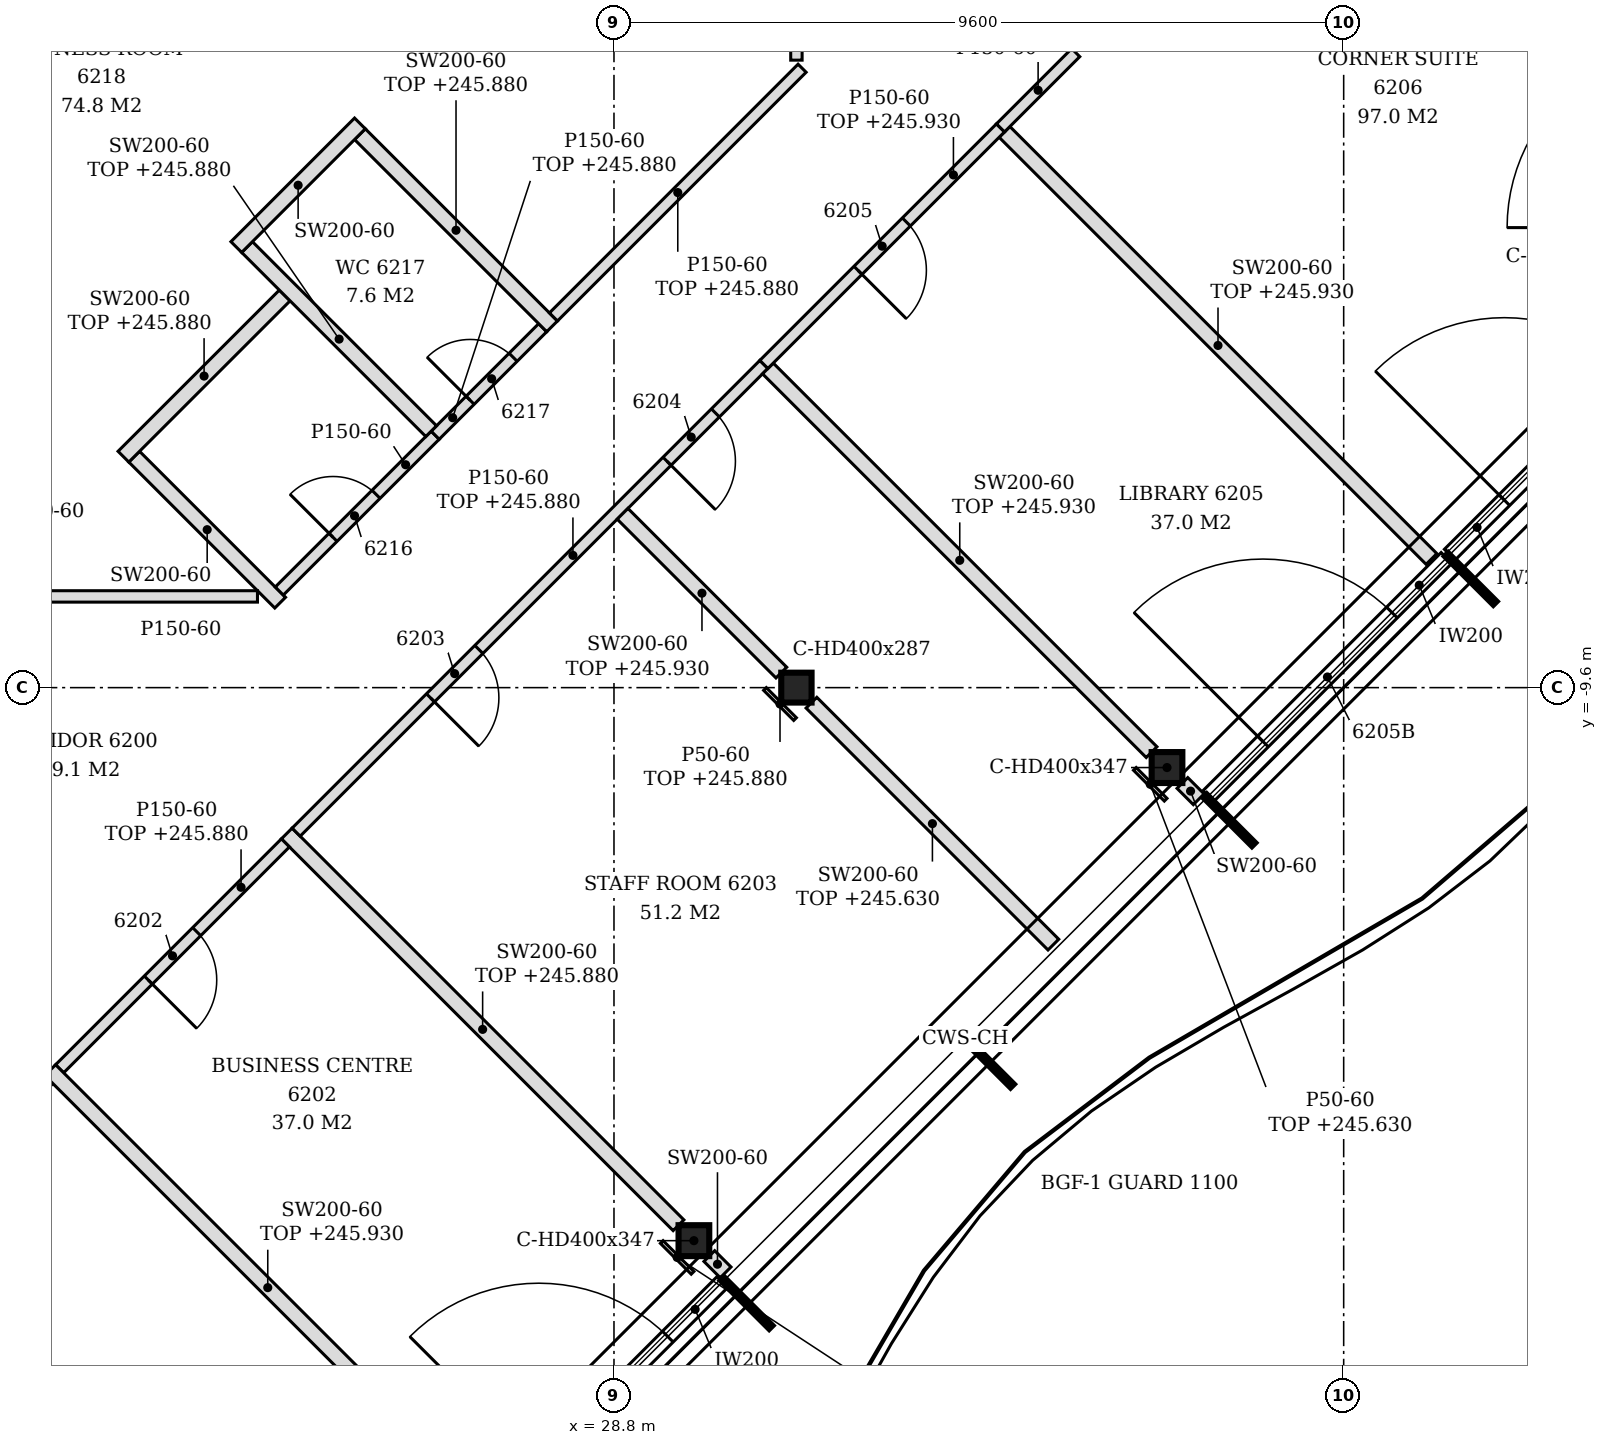
"""IFC4 building model, lengths in metres.
Left out: names, types, materials, properties, quantities, classifications, styles, units other than length and angle.
Written with IfcOpenShell. Run it as: python <this file> out.ifc"""

import sys

from ifc_helpers import new_model, si_unit, direction, frame, frame_2d, origin, origin_2d, place, context, subcontext, project, spatial, rectangle, i_section, extrude, element, fill, save


model = new_model("IFC4")
c1 = context("Model", 3, precision=1e-05, world=origin(), true_north=direction((0.0, 1.0)))
c2 = subcontext(c1, "Body", "Model", "MODEL_VIEW")
j1 = project(units=[si_unit("LENGTHUNIT", "METRE"), si_unit("PLANEANGLEUNIT", "RADIAN")], contexts=[c1])
p1 = place(None, origin())
s1 = spatial("IfcSite", under=j1, at=p1, CompositionType="ELEMENT")
p2 = place(p1, origin())
s2 = spatial("IfcBuilding", under=s1, at=p2, CompositionType="ELEMENT")
p3 = place(p2, frame((0.0, 0.0, 243.0)))
s3 = spatial("IfcBuildingStorey", under=s2, at=p3, CompositionType="ELEMENT", Elevation=243.0)
for number, where, z_axis, x_axis in (
    (1, (29.852, -16.876, -0.15), (0.0, 0.0, 1.0), (1.0, 0.0, 0.0)),
    (2, (36.076, -10.652, -0.15), (0.0, 0.0, 1.0), (1.0, 0.0, 0.0)),
):
    element("IfcColumn", number, at=place(p3, frame(where, z_axis=z_axis, x_axis=x_axis)), inside=s3, PredefinedType="COLUMN", context=c2, shape_type="SweptSolid", body=[
        extrude(i_section(OverallWidth=0.404, OverallDepth=0.407, WebThickness=0.027, FlangeThickness=0.044, FilletRadius=0.015, at=origin_2d()), origin(), (0.0, 0.0, 1.0), 3.6),
    ])
p4 = place(p3, frame((31.2, -9.6, -0.15), z_axis=(0.0, 0.0, 1.0), x_axis=(1.0, 0.0, 0.0)))
e3 = element("IfcColumn", 3, at=p4, inside=s3, PredefinedType="COLUMN", context=c2, shape_type="SweptSolid", body=[
    extrude(i_section(OverallWidth=0.399, OverallDepth=0.393, WebThickness=0.023, FlangeThickness=0.037, FilletRadius=0.015, at=origin_2d()), origin(), (0.0, 0.0, 1.0), 3.6),
])
p5 = place(p3, frame((27.093, -20.553, 0.0), z_axis=(0.0, 0.0, 1.0), x_axis=(0.707079231393, 0.707134329907, 0.0)))
e4 = element("IfcWall", 4, at=p5, inside=s3, PredefinedType="NOTDEFINED", context=c2, shape_type="SweptSolid", body=[
    extrude(rectangle(XDim=4.431, YDim=0.2, at=frame_2d((2.215, 0.0))), origin(), (0.0, 0.0, 1.0), 3.45),
])
p6 = place(p5, frame((1.015, 0.0, 0.0)))
e5 = element("IfcOpeningElement", 5, at=p6, cuts=e4, PredefinedType="OPENING", context=c2, shape_type="SweptSolid", body=[
    extrude(rectangle(XDim=2.4, YDim=2.4, at=frame_2d((1.2, 1.2))), frame((0.0, 0.11, 0.0), z_axis=(0.0, -1.0, 0.0), x_axis=(1.0, 0.0, 0.0)), (0.0, 0.0, 1.0), 0.22),
])
p7 = place(p3, frame((36.62, -11.026, 0.0), z_axis=(0.0, 0.0, 1.0), x_axis=(0.707106781187, 0.707106781187, 0.0)))
e6 = element("IfcWall", 6, at=p7, inside=s3, PredefinedType="NOTDEFINED", context=c2, shape_type="SweptSolid", body=[
    extrude(rectangle(XDim=4.431, YDim=0.2, at=frame_2d((2.215, 0.0))), origin(), (0.0, 0.0, 1.0), 3.45),
])
p8 = place(p7, frame((1.015, 0.0, 0.0)))
e7 = element("IfcOpeningElement", 7, at=p8, cuts=e6, PredefinedType="OPENING", context=c2, shape_type="SweptSolid", body=[
    extrude(rectangle(XDim=2.4, YDim=2.4, at=frame_2d((1.2, 1.2))), frame((0.0, 0.11, 0.0), z_axis=(0.0, -1.0, 0.0), x_axis=(1.0, 0.0, 0.0)), (0.0, 0.0, 1.0), 0.22),
])
p9 = place(p3, frame((39.796, -7.851, 0.0), z_axis=(0.0, 0.0, 1.0), x_axis=(0.707079168996, 0.707134392299, 0.0)))
e8 = element("IfcWall", 8, at=p9, inside=s3, PredefinedType="NOTDEFINED", context=c2, shape_type="SweptSolid", body=[
    extrude(rectangle(XDim=4.421, YDim=0.2, at=frame_2d((2.21, 0.0))), origin(), (0.0, 0.0, 1.0), 3.45),
])
p10 = place(p9, frame((1.016, 0.0, 0.0)))
e9 = element("IfcOpeningElement", 9, at=p10, cuts=e8, PredefinedType="OPENING", context=c2, shape_type="SweptSolid", body=[
    extrude(rectangle(XDim=2.4, YDim=2.4, at=frame_2d((1.2, 1.2))), frame((0.0, 0.11, 0.0), z_axis=(0.0, -1.0, 0.0), x_axis=(1.0, 0.0, 0.0)), (0.0, 0.0, 1.0), 0.22),
])
p11 = place(p3, frame((27.107, -20.355, 0.0), z_axis=(0.0, 0.0, 1.0), x_axis=(-0.707182179369, 0.707031374964, 0.0)))
e10 = element("IfcWall", 10, at=p11, inside=s3, PredefinedType="PARTITIONING", context=c2, shape_type="SweptSolid", body=[
    extrude(rectangle(XDim=8.095, YDim=0.2, at=frame_2d((4.047, 0.0))), origin(), (0.0, 0.0, 1.0), 2.93),
])
p12 = place(p3, frame((30.269, -17.293, 0.0), z_axis=(0.0, 0.0, 1.0), x_axis=(-0.707509117806, 0.706704215511, 0.0)))
e11 = element("IfcWall", 11, at=p12, inside=s3, PredefinedType="PARTITIONING", context=c2, shape_type="SweptSolid", body=[
    extrude(rectangle(XDim=0.303, YDim=0.2, at=frame_2d((0.152, 0.0))), origin(), (0.0, 0.0, 1.0), 3.45),
])
p13 = place(p3, frame((29.649, -16.673, 0.0), z_axis=(0.0, 0.0, 1.0), x_axis=(-0.707106781187, 0.707106781187, 0.0)))
e12 = element("IfcWall", 12, at=p13, inside=s3, PredefinedType="PARTITIONING", context=c2, shape_type="SweptSolid", body=[
    extrude(rectangle(XDim=7.289, YDim=0.2, at=frame_2d((3.644, 0.0))), origin(), (0.0, 0.0, 1.0), 2.88),
])
p14 = place(p3, frame((20.649, -15.472, 0.0), z_axis=(0.0, 0.0, 1.0), x_axis=(0.707106781187, 0.707106781187, 0.0)))
e13 = element("IfcWall", 13, at=p14, inside=s3, PredefinedType="PARTITIONING", context=c2, shape_type="SweptSolid", body=[
    extrude(rectangle(XDim=1.013, YDim=0.15, at=frame_2d((0.506, 0.0))), origin(), (0.0, 0.0, 1.0), 3.45),
])
p15 = place(p3, frame((21.507, -14.614, 0.0), z_axis=(0.0, 0.0, 1.0), x_axis=(0.706990566745, 0.707222976531, 0.0)))
e14 = element("IfcWall", 14, at=p15, inside=s3, PredefinedType="PARTITIONING", context=c2, shape_type="SweptSolid", body=[
    extrude(rectangle(XDim=4.202, YDim=0.15, at=frame_2d((2.101, 0.0))), origin(), (0.0, 0.0, 1.0), 2.88),
])
p16 = place(p15, frame((1.651, 0.0, 0.0)))
e15 = element("IfcOpeningElement", 15, at=p16, cuts=e14, PredefinedType="OPENING", context=c2, shape_type="SweptSolid", body=[
    extrude(rectangle(XDim=0.9, YDim=2.1, at=frame_2d((0.45, 1.05))), frame((0.0, 0.085, 0.0), z_axis=(0.0, -1.0, 0.0), x_axis=(1.0, 0.0, 0.0)), (0.0, 0.0, 1.0), 0.17),
])
p17 = place(p3, frame((34.581, -12.981, 0.0), z_axis=(0.0, 0.0, 1.0), x_axis=(-0.707133900936, 0.707079660397, 0.0)))
e16 = element("IfcWall", 16, at=p17, inside=s3, PredefinedType="PARTITIONING", context=c2, shape_type="SweptSolid", body=[
    extrude(rectangle(XDim=4.501, YDim=0.2, at=frame_2d((2.25, 0.0))), origin(), (0.0, 0.0, 1.0), 2.63),
])
p18 = place(p3, frame((24.619, -11.501, 0.0), z_axis=(0.0, 0.0, 1.0), x_axis=(0.707106781187, 0.707106781187, 0.0)))
e17 = element("IfcWall", 17, at=p18, inside=s3, PredefinedType="PARTITIONING", context=c2, shape_type="SweptSolid", body=[
    extrude(rectangle(XDim=8.702, YDim=0.15, at=frame_2d((4.351, 0.0))), origin(), (0.0, 0.0, 1.0), 2.88),
])
p19 = place(p18, frame((2.499, 0.0, 0.0)))
e18 = element("IfcOpeningElement", 18, at=p19, cuts=e17, PredefinedType="OPENING", context=c2, shape_type="SweptSolid", body=[
    extrude(rectangle(XDim=0.9, YDim=2.1, at=frame_2d((0.45, 1.05))), frame((0.0, 0.085, 0.0), z_axis=(0.0, -1.0, 0.0), x_axis=(1.0, 0.0, 0.0)), (0.0, 0.0, 1.0), 0.17),
])
p20 = place(p18, frame((6.9, 0.0, 0.0)))
e19 = element("IfcOpeningElement", 19, at=p20, cuts=e17, PredefinedType="OPENING", context=c2, shape_type="SweptSolid", body=[
    extrude(rectangle(XDim=0.9, YDim=2.1, at=frame_2d((0.45, 1.05))), frame((0.0, 0.085, 0.0), z_axis=(0.0, -1.0, 0.0), x_axis=(1.0, 0.0, 0.0)), (0.0, 0.0, 1.0), 0.17),
])
p21 = place(p3, frame((36.493, -11.069, 0.0), z_axis=(0.0, 0.0, 1.0), x_axis=(-0.707106781187, 0.707106781187, 0.0)))
e20 = element("IfcWall", 20, at=p21, inside=s3, PredefinedType="PARTITIONING", context=c2, shape_type="SweptSolid", body=[
    extrude(rectangle(XDim=0.303, YDim=0.2, at=frame_2d((0.152, 0.0))), origin(), (0.0, 0.0, 1.0), 3.45),
])
p22 = place(p3, frame((35.873, -10.449, 0.0), z_axis=(0.0, 0.0, 1.0), x_axis=(-0.707089680867, 0.707123881093, 0.0)))
e21 = element("IfcWall", 21, at=p22, inside=s3, PredefinedType="PARTITIONING", context=c2, shape_type="SweptSolid", body=[
    extrude(rectangle(XDim=7.139, YDim=0.2, at=frame_2d((3.569, 0.0))), origin(), (0.0, 0.0, 1.0), 2.93),
])
p23 = place(p3, frame((31.002, -9.402, 0.0), z_axis=(0.0, 0.0, 1.0), x_axis=(-0.707065460118, 0.70714809984, 0.0)))
e22 = element("IfcWall", 22, at=p23, inside=s3, PredefinedType="PARTITIONING", context=c2, shape_type="SweptSolid", body=[
    extrude(rectangle(XDim=2.954, YDim=0.2, at=frame_2d((1.477, 0.0))), origin(), (0.0, 0.0, 1.0), 2.93),
])
p24 = place(p3, frame((24.408, -8.482, 0.0), z_axis=(0.0, 0.0, 1.0), x_axis=(-0.707061835578, 0.707151723938, 0.0)))
e23 = element("IfcWall", 23, at=p24, inside=s3, PredefinedType="PARTITIONING", context=c2, shape_type="SweptSolid", body=[
    extrude(rectangle(XDim=2.716, YDim=0.2, at=frame_2d((1.358, 0.0))), origin(), (0.0, 0.0, 1.0), 3.45),
])
p25 = place(p3, frame((21.215, -8.4, 0.0), z_axis=(0.0, 0.0, 1.0), x_axis=(1.0, 0.0, 0.0)))
e24 = element("IfcWall", 24, at=p25, inside=s3, PredefinedType="PARTITIONING", context=c2, shape_type="SweptSolid", body=[
    extrude(rectangle(XDim=2.895, YDim=0.15, at=frame_2d((1.447, 0.0))), origin(), (0.0, 0.0, 1.0), 3.45),
])
p26 = place(p3, frame((24.397, -8.329, 0.0), z_axis=(0.0, 0.0, 1.0), x_axis=(0.707275119896, 0.706938402391, 0.0)))
e25 = element("IfcWall", 25, at=p26, inside=s3, PredefinedType="PARTITIONING", context=c2, shape_type="SweptSolid", body=[
    extrude(rectangle(XDim=2.9, YDim=0.15, at=frame_2d((1.45, 0.0))), origin(), (0.0, 0.0, 1.0), 3.45),
])
p27 = place(p26, frame((1.0, 0.0, 0.0)))
e26 = element("IfcOpeningElement", 26, at=p27, cuts=e25, PredefinedType="OPENING", context=c2, shape_type="SweptSolid", body=[
    extrude(rectangle(XDim=0.8, YDim=2.1, at=frame_2d((0.4, 1.05))), frame((0.0, 0.085, 0.0), z_axis=(0.0, -1.0, 0.0), x_axis=(1.0, 0.0, 0.0)), (0.0, 0.0, 1.0), 0.17),
])
p28 = place(p3, frame((39.555, -7.907, 0.0), z_axis=(0.0, 0.0, 1.0), x_axis=(-0.707060685068, 0.7071528743, 0.0)))
e27 = element("IfcWall", 27, at=p28, inside=s3, PredefinedType="PARTITIONING", context=c2, shape_type="SweptSolid", body=[
    extrude(rectangle(XDim=7.945, YDim=0.2, at=frame_2d((3.972, 0.0))), origin(), (0.0, 0.0, 1.0), 2.93),
])
p29 = place(p3, frame((22.346, -6.562, 0.0), z_axis=(0.0, 0.0, 1.0), x_axis=(0.707269502796, 0.706944022123, 0.0)))
e28 = element("IfcWall", 28, at=p29, inside=s3, PredefinedType="PARTITIONING", context=c2, shape_type="SweptSolid", body=[
    extrude(rectangle(XDim=3.0, YDim=0.2, at=frame_2d((1.5, 0.0))), origin(), (0.0, 0.0, 1.0), 2.88),
])
p30 = place(p3, frame((26.448, -6.279, 0.0), z_axis=(0.0, 0.0, 1.0), x_axis=(0.707106781187, 0.707106781187, 0.0)))
e29 = element("IfcWall", 29, at=p30, inside=s3, PredefinedType="PARTITIONING", context=c2, shape_type="SweptSolid", body=[
    extrude(rectangle(XDim=2.0, YDim=0.15, at=frame_2d((1.0, 0.0))), origin(), (0.0, 0.0, 1.0), 2.88),
])
p31 = place(p30, frame((0.65, 0.0, 0.0)))
e30 = element("IfcOpeningElement", 30, at=p31, cuts=e29, PredefinedType="OPENING", context=c2, shape_type="SweptSolid", body=[
    extrude(rectangle(XDim=0.8, YDim=2.1, at=frame_2d((0.4, 1.05))), frame((0.0, 0.085, 0.0), z_axis=(0.0, -1.0, 0.0), x_axis=(1.0, 0.0, 0.0)), (0.0, 0.0, 1.0), 0.17),
])
p32 = place(p3, frame((26.395, -6.226, 0.0), z_axis=(0.0, 0.0, 1.0), x_axis=(-0.707106781187, 0.707106781187, 0.0)))
e31 = element("IfcWall", 31, at=p32, inside=s3, PredefinedType="PARTITIONING", context=c2, shape_type="SweptSolid", body=[
    extrude(rectangle(XDim=3.426, YDim=0.2, at=frame_2d((1.713, 0.0))), origin(), (0.0, 0.0, 1.0), 2.88),
])
p33 = place(p3, frame((30.772, -5.348, 0.0), z_axis=(0.0, 0.0, 1.0), x_axis=(0.70724543229, 0.706968102891, 0.0)))
e32 = element("IfcWall", 32, at=p33, inside=s3, PredefinedType="PARTITIONING", context=c2, shape_type="SweptSolid", body=[
    extrude(rectangle(XDim=4.402, YDim=0.15, at=frame_2d((2.201, 0.0))), origin(), (0.0, 0.0, 1.0), 2.93),
])
p34 = place(p33, frame((1.751, 0.0, 0.0)))
e33 = element("IfcOpeningElement", 33, at=p34, cuts=e32, PredefinedType="OPENING", context=c2, shape_type="SweptSolid", body=[
    extrude(rectangle(XDim=0.9, YDim=2.1, at=frame_2d((0.45, 1.05))), frame((0.0, 0.085, 0.0), z_axis=(0.0, -1.0, 0.0), x_axis=(1.0, 0.0, 0.0)), (0.0, 0.0, 1.0), 0.17),
])
p35 = place(p3, frame((27.986, -4.847, 0.0), z_axis=(0.0, 0.0, 1.0), x_axis=(-0.707106781187, 0.707106781187, 0.0)))
e34 = element("IfcWall", 34, at=p35, inside=s3, PredefinedType="PARTITIONING", context=c2, shape_type="SweptSolid", body=[
    extrude(rectangle(XDim=3.576, YDim=0.2, at=frame_2d((1.788, 0.0))), origin(), (0.0, 0.0, 1.0), 2.88),
])
p36 = place(p3, frame((28.004, -4.723, 0.0), z_axis=(0.0, 0.0, 1.0), x_axis=(0.706974860744, 0.707238677022, 0.0)))
e35 = element("IfcWall", 35, at=p36, inside=s3, PredefinedType="PARTITIONING", context=c2, shape_type="SweptSolid", body=[
    extrude(rectangle(XDim=4.627, YDim=0.15, at=frame_2d((2.313, 0.0))), origin(), (0.0, 0.0, 1.0), 2.88),
])
p37 = place(p3, frame((23.831, -3.804, 0.0), z_axis=(0.0, 0.0, 1.0), x_axis=(0.707106781187, 0.707106781187, 0.0)))
e36 = element("IfcWall", 36, at=p37, inside=s3, PredefinedType="PARTITIONING", context=c2, shape_type="SweptSolid", body=[
    extrude(rectangle(XDim=2.3, YDim=0.2, at=frame_2d((1.15, 0.0))), origin(), (0.0, 0.0, 1.0), 3.45),
])
p38 = place(p3, frame((33.885, -2.236, 0.0), z_axis=(0.0, 0.0, 1.0), x_axis=(0.707106781187, 0.707106781187, 0.0)))
e37 = element("IfcWall", 37, at=p38, inside=s3, PredefinedType="PARTITIONING", context=c2, shape_type="SweptSolid", body=[
    extrude(rectangle(XDim=1.4, YDim=0.15, at=frame_2d((0.7, 0.0))), origin(), (0.0, 0.0, 1.0), 3.45),
])
p39 = place(p3, frame((31.2, -1.345, 0.0), z_axis=(0.0, 0.0, 1.0), x_axis=(0.0, 1.0, 0.0)))
e38 = element("IfcWall", 38, at=p39, inside=s3, PredefinedType="PARTITIONING", context=c2, shape_type="SweptSolid", body=[
    extrude(rectangle(XDim=1.148, YDim=0.15, at=frame_2d((0.574, 0.0))), origin(), (0.0, 0.0, 1.0), 2.93),
])
p40 = place(p3, frame((29.834, -17.299, 0.0), z_axis=(0.0, 0.0, 1.0), x_axis=(-0.707106781187, 0.707106781187, 0.0)))
e39 = element("IfcWall", 39, at=p40, inside=s3, PredefinedType="PARTITIONING", context=c2, shape_type="SweptSolid", body=[
    extrude(rectangle(XDim=0.573, YDim=0.05, at=frame_2d((0.287, 0.0))), origin(), (0.0, 0.0, 1.0), 2.93),
])
p41 = place(p3, frame((31.182, -10.014, 0.0), z_axis=(0.0, 0.0, 1.0), x_axis=(-0.707106781187, 0.707106781187, 0.0)))
e40 = element("IfcWall", 40, at=p41, inside=s3, PredefinedType="PARTITIONING", context=c2, shape_type="SweptSolid", body=[
    extrude(rectangle(XDim=0.56, YDim=0.05, at=frame_2d((0.28, 0.0))), origin(), (0.0, 0.0, 1.0), 2.88),
])
p42 = place(p3, frame((36.058, -11.075, 0.0), z_axis=(0.0, 0.0, 1.0), x_axis=(-0.707106781187, 0.707106781187, 0.0)))
e41 = element("IfcWall", 41, at=p42, inside=s3, PredefinedType="PARTITIONING", context=c2, shape_type="SweptSolid", body=[
    extrude(rectangle(XDim=0.573, YDim=0.05, at=frame_2d((0.287, 0.0))), origin(), (0.0, 0.0, 1.0), 2.63),
])
p43 = place(p6, origin())
e42 = element("IfcDoor", 42, at=p43, inside=s3, OperationType="SINGLE_SWING_LEFT", PredefinedType="DOOR", context=c2, shape_type="SweptSolid", body=[
    extrude(rectangle(XDim=2.4, YDim=2.4, at=frame_2d((1.2, 1.2))), frame((0.0, 0.025, 0.0), z_axis=(0.0, -1.0, 0.0), x_axis=(1.0, 0.0, 0.0)), (0.0, 0.0, 1.0), 0.05),
])
fill(e5, e42)
p44 = place(p8, origin())
e43 = element("IfcDoor", 43, at=p44, inside=s3, OperationType="SINGLE_SWING_LEFT", PredefinedType="DOOR", context=c2, shape_type="SweptSolid", body=[
    extrude(rectangle(XDim=2.4, YDim=2.4, at=frame_2d((1.2, 1.2))), frame((0.0, 0.025, 0.0), z_axis=(0.0, -1.0, 0.0), x_axis=(1.0, 0.0, 0.0)), (0.0, 0.0, 1.0), 0.05),
])
fill(e7, e43)
p45 = place(p10, origin())
e44 = element("IfcDoor", 44, at=p45, inside=s3, OperationType="SINGLE_SWING_LEFT", PredefinedType="DOOR", context=c2, shape_type="SweptSolid", body=[
    extrude(rectangle(XDim=2.4, YDim=2.4, at=frame_2d((1.2, 1.2))), frame((0.0, 0.025, 0.0), z_axis=(0.0, -1.0, 0.0), x_axis=(1.0, 0.0, 0.0)), (0.0, 0.0, 1.0), 0.05),
])
fill(e9, e44)
p46 = place(p16, frame((0.9, 0.0, 0.0), z_axis=(0.0, 0.0, 1.0), x_axis=(-1.0, 0.0, 0.0)))
e45 = element("IfcDoor", 45, at=p46, inside=s3, OperationType="SINGLE_SWING_RIGHT", PredefinedType="DOOR", context=c2, shape_type="SweptSolid", body=[
    extrude(rectangle(XDim=0.9, YDim=2.1, at=frame_2d((0.45, 1.05))), frame((0.0, 0.025, 0.0), z_axis=(0.0, -1.0, 0.0), x_axis=(1.0, 0.0, 0.0)), (0.0, 0.0, 1.0), 0.05),
])
fill(e15, e45)
p47 = place(p19, frame((0.9, 0.0, 0.0), z_axis=(0.0, 0.0, 1.0), x_axis=(-1.0, 0.0, 0.0)))
e46 = element("IfcDoor", 46, at=p47, inside=s3, OperationType="SINGLE_SWING_RIGHT", PredefinedType="DOOR", context=c2, shape_type="SweptSolid", body=[
    extrude(rectangle(XDim=0.9, YDim=2.1, at=frame_2d((0.45, 1.05))), frame((0.0, 0.025, 0.0), z_axis=(0.0, -1.0, 0.0), x_axis=(1.0, 0.0, 0.0)), (0.0, 0.0, 1.0), 0.05),
])
fill(e18, e46)
p48 = place(p20, frame((0.9, 0.0, 0.0), z_axis=(0.0, 0.0, 1.0), x_axis=(-1.0, 0.0, 0.0)))
e47 = element("IfcDoor", 47, at=p48, inside=s3, OperationType="SINGLE_SWING_RIGHT", PredefinedType="DOOR", context=c2, shape_type="SweptSolid", body=[
    extrude(rectangle(XDim=0.9, YDim=2.1, at=frame_2d((0.45, 1.05))), frame((0.0, 0.025, 0.0), z_axis=(0.0, -1.0, 0.0), x_axis=(1.0, 0.0, 0.0)), (0.0, 0.0, 1.0), 0.05),
])
fill(e19, e47)
p49 = place(p34, frame((0.9, 0.0, 0.0), z_axis=(0.0, 0.0, 1.0), x_axis=(-1.0, 0.0, 0.0)))
e48 = element("IfcDoor", 48, at=p49, inside=s3, OperationType="SINGLE_SWING_RIGHT", PredefinedType="DOOR", context=c2, shape_type="SweptSolid", body=[
    extrude(rectangle(XDim=0.9, YDim=2.1, at=frame_2d((0.45, 1.05))), frame((0.0, 0.025, 0.0), z_axis=(0.0, -1.0, 0.0), x_axis=(1.0, 0.0, 0.0)), (0.0, 0.0, 1.0), 0.05),
])
fill(e33, e48)
p50 = place(p27, origin())
e49 = element("IfcDoor", 49, at=p50, inside=s3, OperationType="SINGLE_SWING_LEFT", PredefinedType="DOOR", context=c2, shape_type="SweptSolid", body=[
    extrude(rectangle(XDim=0.8, YDim=2.1, at=frame_2d((0.4, 1.05))), frame((0.0, 0.025, 0.0), z_axis=(0.0, -1.0, 0.0), x_axis=(1.0, 0.0, 0.0)), (0.0, 0.0, 1.0), 0.05),
])
fill(e26, e49)
p51 = place(p31, origin())
e50 = element("IfcDoor", 50, at=p51, inside=s3, OperationType="SINGLE_SWING_LEFT", PredefinedType="DOOR", context=c2, shape_type="SweptSolid", body=[
    extrude(rectangle(XDim=0.8, YDim=2.1, at=frame_2d((0.4, 1.05))), frame((0.0, 0.025, 0.0), z_axis=(0.0, -1.0, 0.0), x_axis=(1.0, 0.0, 0.0)), (0.0, 0.0, 1.0), 0.05),
])
fill(e30, e50)
save(model, sys.argv[1])
